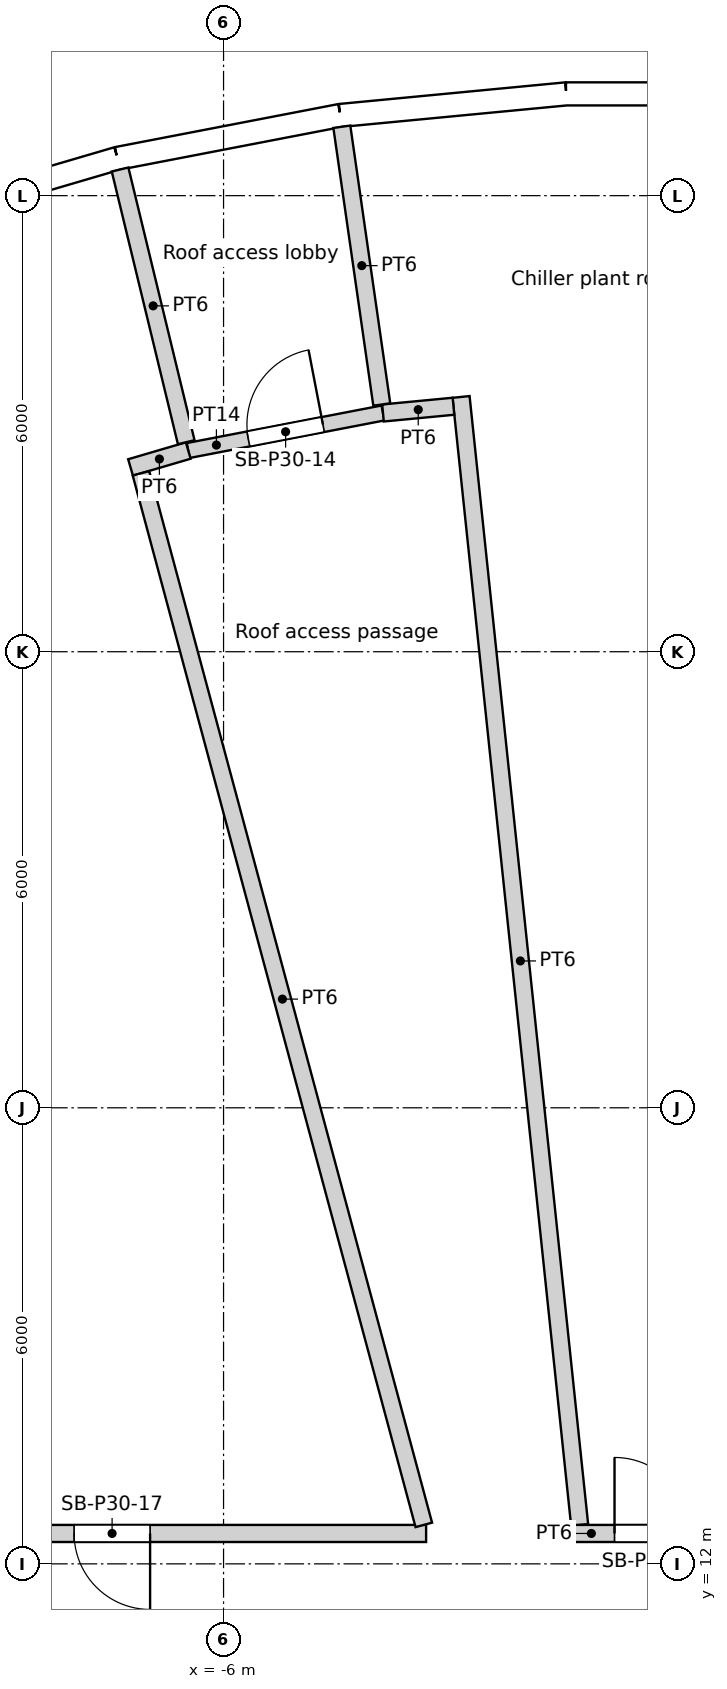
"""IFC4 building model, lengths in metres.
Left out: names, types, materials, properties, quantities, classifications, styles, units other than length and angle.
Written with IfcOpenShell. Run it as: python <this file> out.ifc"""

import sys

from ifc_helpers import new_model, si_unit, direction, frame, frame_2d, origin, origin_2d, place, context, subcontext, project, spatial, rectangle, circle, extrude, element, fill, save


model = new_model("IFC4")
c1 = context("Model", 3, precision=1e-05, world=origin(), true_north=direction((0.0, 1.0)))
c2 = subcontext(c1, "Body", "Model", "MODEL_VIEW")
j1 = project(units=[si_unit("LENGTHUNIT", "METRE"), si_unit("PLANEANGLEUNIT", "RADIAN")], contexts=[c1])
p1 = place(None, origin())
s1 = spatial("IfcSite", under=j1, at=p1, CompositionType="ELEMENT")
p2 = place(p1, origin())
s2 = spatial("IfcBuilding", under=s1, at=p2, CompositionType="ELEMENT")
p3 = place(p2, frame((0.0, 0.0, 120.0)))
s3 = spatial("IfcBuildingStorey", under=s2, at=p3, CompositionType="ELEMENT", Elevation=120.0)
p4 = place(p3, frame((-4.309, 29.966, 0.0), z_axis=(0.0, 0.0, 1.0), x_axis=(1.0, 0.0, 0.0)))
e1 = element("IfcColumn", 1, at=p4, inside=s3, PredefinedType="COLUMN", context=c2, shape_type="SweptSolid", body=[
    extrude(circle(Radius=0.6, at=origin_2d()), origin(), (0.0, 0.0, 1.0), 6.0),
])
for number, where, z_axis, x_axis in (
    (2, (-1.427, 24.506, 0.0), (0.0, 0.0, 1.0), (1.0, 0.0, 0.0)),
    (3, (-7.04, 23.516, 0.0), (0.0, 0.0, 1.0), (1.0, 0.0, 0.0)),
):
    element("IfcColumn", number, at=place(p3, frame(where, z_axis=z_axis, x_axis=x_axis)), inside=s3, PredefinedType="COLUMN", context=c2, shape_type="SweptSolid", body=[
        extrude(circle(Radius=0.65, at=origin_2d()), origin(), (0.0, 0.0, 1.0), 6.0),
    ])
p5 = place(p3, frame((-4.188, 18.35, 0.0), z_axis=(0.0, 0.0, 1.0), x_axis=(1.0, 0.0, 0.0)))
e4 = element("IfcColumn", 4, at=p5, inside=s3, PredefinedType="COLUMN", context=c2, shape_type="SweptSolid", body=[
    extrude(circle(Radius=0.7, at=origin_2d()), origin(), (0.0, 0.0, 1.0), 6.0),
])
p6 = place(p3, frame((1.493, 31.339, 0.0), z_axis=(0.0, 0.0, 1.0), x_axis=(-1.0, 0.0, 0.0)))
e5 = element("IfcWall", 5, at=p6, inside=s3, PredefinedType="SOLIDWALL", context=c2, shape_type="SweptSolid", body=[
    extrude(rectangle(XDim=2.986, YDim=0.3, at=frame_2d((1.493, 0.0))), origin(), (0.0, 0.0, 1.0), 5.7),
])
p7 = place(p6, frame((1.493, 0.0, 1.8)))
e6 = element("IfcOpeningElement", 6, at=p7, cuts=e5, PredefinedType="OPENING", context=c2, shape_type="SweptSolid", body=[
    extrude(circle(Radius=1.2, at=origin_2d()), frame((0.0, 0.16, 0.0), z_axis=(0.0, -1.0, 0.0), x_axis=(1.0, 0.0, 0.0)), (0.0, 0.0, 1.0), 0.32),
])
p8 = place(p3, frame((-1.493, 31.339, 0.0), z_axis=(0.0, 0.0, 1.0), x_axis=(-0.99547560533, -0.095017467833, 0.0)))
e7 = element("IfcWall", 7, at=p8, inside=s3, PredefinedType="SOLIDWALL", context=c2, shape_type="SweptSolid", body=[
    extrude(rectangle(XDim=2.986, YDim=0.3, at=frame_2d((1.493, 0.0))), origin(), (0.0, 0.0, 1.0), 5.7),
])
p9 = place(p8, frame((1.493, 0.0, 1.8)))
e8 = element("IfcOpeningElement", 8, at=p9, cuts=e7, PredefinedType="OPENING", context=c2, shape_type="SweptSolid", body=[
    extrude(circle(Radius=1.2, at=origin_2d()), frame((0.0, 0.16, 0.0), z_axis=(0.0, -1.0, 0.0), x_axis=(1.0, 0.0, 0.0)), (0.0, 0.0, 1.0), 0.32),
])
p10 = place(p3, frame((-4.465, 31.055, 0.0), z_axis=(0.0, 0.0, 1.0), x_axis=(-0.981918853666, -0.189302310646, 0.0)))
e9 = element("IfcWall", 9, at=p10, inside=s3, PredefinedType="SOLIDWALL", context=c2, shape_type="SweptSolid", body=[
    extrude(rectangle(XDim=2.986, YDim=0.3, at=frame_2d((1.493, 0.0))), origin(), (0.0, 0.0, 1.0), 5.7),
])
p11 = place(p10, frame((1.493, 0.0, 1.8)))
e10 = element("IfcOpeningElement", 10, at=p11, cuts=e9, PredefinedType="OPENING", context=c2, shape_type="SweptSolid", body=[
    extrude(circle(Radius=1.2, at=origin_2d()), frame((0.0, 0.16, 0.0), z_axis=(0.0, -1.0, 0.0), x_axis=(1.0, 0.0, 0.0)), (0.0, 0.0, 1.0), 0.32),
])
p12 = place(p3, frame((-7.397, 30.49, 0.0), z_axis=(0.0, 0.0, 1.0), x_axis=(-0.959502108153, -0.281701445593, 0.0)))
e11 = element("IfcWall", 11, at=p12, inside=s3, PredefinedType="SOLIDWALL", context=c2, shape_type="SweptSolid", body=[
    extrude(rectangle(XDim=2.986, YDim=0.3, at=frame_2d((1.493, 0.0))), origin(), (0.0, 0.0, 1.0), 5.7),
])
p13 = place(p12, frame((1.493, 0.0, 1.8)))
e12 = element("IfcOpeningElement", 12, at=p13, cuts=e11, PredefinedType="OPENING", context=c2, shape_type="SweptSolid", body=[
    extrude(circle(Radius=1.2, at=origin_2d()), frame((0.0, 0.16, 0.0), z_axis=(0.0, -1.0, 0.0), x_axis=(1.0, 0.0, 0.0)), (0.0, 0.0, 1.0), 0.32),
])
p14 = place(p3, frame((-7.361, 30.344, 0.0), z_axis=(0.0, 0.0, 1.0), x_axis=(0.235713599034, -0.971822565714, 0.0)))
e13 = element("IfcWall", 13, at=p14, inside=s3, PredefinedType="PARTITIONING", context=c2, shape_type="SweptSolid", body=[
    extrude(rectangle(XDim=3.691, YDim=0.225, at=frame_2d((1.846, 0.0))), origin(), (0.0, 0.0, 1.0), 5.2),
])
p15 = place(p3, frame((-7.086, 26.347, 0.0), z_axis=(0.0, 0.0, 1.0), x_axis=(0.259707010598, -0.965687459091, 0.0)))
e14 = element("IfcWall", 14, at=p15, inside=s3, PredefinedType="PARTITIONING", context=c2, shape_type="SweptSolid", body=[
    extrude(rectangle(XDim=14.327, YDim=0.225, at=frame_2d((7.163, 0.0))), origin(), (0.0, 0.0, 1.0), 5.2),
])
p16 = place(p3, frame((-6.465, 26.647, 0.0), z_axis=(0.0, 0.0, 1.0), x_axis=(-0.959542293585, -0.281564534025, 0.0)))
e15 = element("IfcWall", 15, at=p16, inside=s3, PredefinedType="PARTITIONING", context=c2, shape_type="SweptSolid", body=[
    extrude(rectangle(XDim=0.791, YDim=0.225, at=frame_2d((0.396, 0.0))), origin(), (0.0, 0.0, 1.0), 5.2),
])
p17 = place(p3, frame((-4.444, 30.906, 0.0), z_axis=(0.0, 0.0, 1.0), x_axis=(0.142319391599, -0.989820787201, 0.0)))
e16 = element("IfcWall", 16, at=p17, inside=s3, PredefinedType="PARTITIONING", context=c2, shape_type="SweptSolid", body=[
    extrude(rectangle(XDim=3.692, YDim=0.225, at=frame_2d((1.846, 0.0))), origin(), (0.0, 0.0, 1.0), 5.2),
])
p18 = place(p3, frame((-6.465, 26.647, 0.0), z_axis=(0.0, 0.0, 1.0), x_axis=(0.981924271327, 0.18927420685, 0.0)))
e17 = element("IfcWall", 17, at=p18, inside=s3, PredefinedType="PARTITIONING", context=c2, shape_type="SweptSolid", body=[
    extrude(rectangle(XDim=2.609, YDim=0.2, at=frame_2d((1.305, 0.0))), origin(), (0.0, 0.0, 1.0), 5.2),
])
p19 = place(p18, frame((0.805, 0.0, 0.0)))
e18 = element("IfcOpeningElement", 18, at=p19, cuts=e17, PredefinedType="OPENING", context=c2, shape_type="SweptSolid", body=[
    extrude(rectangle(XDim=1.0, YDim=2.1, at=frame_2d((0.5, 1.05))), frame((0.0, 0.1, 0.0), z_axis=(0.0, -1.0, 0.0), x_axis=(1.0, 0.0, 0.0)), (0.0, 0.0, 1.0), 0.2),
])
p20 = place(p3, frame((-3.335, 12.4, 0.0), z_axis=(0.0, 0.0, 1.0), x_axis=(-1.0, 0.0, 0.0)))
e19 = element("IfcWall", 19, at=p20, inside=s3, PredefinedType="PARTITIONING", context=c2, shape_type="SweptSolid", body=[
    extrude(rectangle(XDim=8.375, YDim=0.225, at=frame_2d((4.188, 0.0))), origin(), (0.0, 0.0, 1.0), 5.2),
])
p21 = place(p20, frame((3.631, 0.0, 0.0)))
e20 = element("IfcOpeningElement", 20, at=p21, cuts=e19, PredefinedType="OPENING", context=c2, shape_type="SweptSolid", body=[
    extrude(rectangle(XDim=1.0, YDim=2.1, at=frame_2d((0.5, 1.05))), frame((0.0, 0.113, 0.0), z_axis=(0.0, -1.0, 0.0), x_axis=(1.0, 0.0, 0.0)), (0.0, 0.0, 1.0), 0.225),
])
p22 = place(p3, frame((-2.975, 27.229, 0.0), z_axis=(0.0, 0.0, 1.0), x_axis=(-0.995461237405, -0.095167877055, 0.0)))
e21 = element("IfcWall", 21, at=p22, inside=s3, PredefinedType="PARTITIONING", context=c2, shape_type="SweptSolid", body=[
    extrude(rectangle(XDim=0.931, YDim=0.225, at=frame_2d((0.466, 0.0))), origin(), (0.0, 0.0, 1.0), 5.2),
])
p23 = place(p3, frame((-2.875, 27.352, 0.0), z_axis=(0.0, 0.0, 1.0), x_axis=(0.104532331853, -0.994521488756, 0.0)))
e22 = element("IfcWall", 22, at=p23, inside=s3, PredefinedType="PARTITIONING", context=c2, shape_type="SweptSolid", body=[
    extrude(rectangle(XDim=14.922, YDim=0.225, at=frame_2d((7.461, 0.0))), origin(), (0.0, 0.0, 1.0), 5.2),
])
p24 = place(p3, frame((0.591, 12.4, 0.0), z_axis=(0.0, 0.0, 1.0), x_axis=(-1.0, 0.0, 0.0)))
e23 = element("IfcWall", 23, at=p24, inside=s3, PredefinedType="PARTITIONING", context=c2, shape_type="SweptSolid", body=[
    extrude(rectangle(XDim=2.007, YDim=0.225, at=frame_2d((1.003, 0.0))), origin(), (0.0, 0.0, 1.0), 5.2),
])
p25 = place(p24, frame((0.447, 0.0, 0.0)))
e24 = element("IfcOpeningElement", 24, at=p25, cuts=e23, PredefinedType="OPENING", context=c2, shape_type="SweptSolid", body=[
    extrude(rectangle(XDim=1.0, YDim=2.1, at=frame_2d((0.5, 1.05))), frame((0.0, 0.113, 0.0), z_axis=(0.0, -1.0, 0.0), x_axis=(1.0, 0.0, 0.0)), (0.0, 0.0, 1.0), 0.225),
])
p26 = place(p7, origin())
e25 = element("IfcWindow", 25, at=p26, inside=s3, PartitioningType="SINGLE_PANEL", PredefinedType="WINDOW", context=c2, shape_type="SweptSolid", body=[
    extrude(circle(Radius=1.2, at=origin_2d()), frame((0.0, 0.12, 0.0), z_axis=(0.0, -1.0, 0.0), x_axis=(1.0, 0.0, 0.0)), (0.0, 0.0, 1.0), 0.1),
])
fill(e6, e25)
p27 = place(p9, origin())
e26 = element("IfcWindow", 26, at=p27, inside=s3, PartitioningType="SINGLE_PANEL", PredefinedType="WINDOW", context=c2, shape_type="SweptSolid", body=[
    extrude(circle(Radius=1.2, at=origin_2d()), frame((0.0, 0.12, 0.0), z_axis=(0.0, -1.0, 0.0), x_axis=(1.0, 0.0, 0.0)), (0.0, 0.0, 1.0), 0.1),
])
fill(e8, e26)
p28 = place(p11, origin())
e27 = element("IfcWindow", 27, at=p28, inside=s3, PartitioningType="SINGLE_PANEL", PredefinedType="WINDOW", context=c2, shape_type="SweptSolid", body=[
    extrude(circle(Radius=1.2, at=origin_2d()), frame((0.0, 0.12, 0.0), z_axis=(0.0, -1.0, 0.0), x_axis=(1.0, 0.0, 0.0)), (0.0, 0.0, 1.0), 0.1),
])
fill(e10, e27)
p29 = place(p13, origin())
e28 = element("IfcWindow", 28, at=p29, inside=s3, PartitioningType="SINGLE_PANEL", PredefinedType="WINDOW", context=c2, shape_type="SweptSolid", body=[
    extrude(circle(Radius=1.2, at=origin_2d()), frame((0.0, 0.12, 0.0), z_axis=(0.0, -1.0, 0.0), x_axis=(1.0, 0.0, 0.0)), (0.0, 0.0, 1.0), 0.1),
])
fill(e12, e28)
p30 = place(p19, origin())
e29 = element("IfcDoor", 29, at=p30, inside=s3, OperationType="SINGLE_SWING_RIGHT", PredefinedType="DOOR", context=c2, shape_type="SweptSolid", body=[
    extrude(rectangle(XDim=1.0, YDim=2.1, at=frame_2d((0.5, 1.05))), frame((0.0, 0.025, 0.0), z_axis=(0.0, -1.0, 0.0), x_axis=(1.0, 0.0, 0.0)), (0.0, 0.0, 1.0), 0.05),
])
fill(e18, e29)
p31 = place(p25, origin())
e30 = element("IfcDoor", 30, at=p31, inside=s3, OperationType="SINGLE_SWING_LEFT", PredefinedType="DOOR", context=c2, shape_type="SweptSolid", body=[
    extrude(rectangle(XDim=1.0, YDim=2.1, at=frame_2d((0.5, 1.05))), frame((0.0, 0.025, 0.0), z_axis=(0.0, -1.0, 0.0), x_axis=(1.0, 0.0, 0.0)), (0.0, 0.0, 1.0), 0.05),
])
fill(e24, e30)
p32 = place(p21, origin())
e31 = element("IfcDoor", 31, at=p32, inside=s3, OperationType="SINGLE_SWING_LEFT", PredefinedType="DOOR", context=c2, shape_type="SweptSolid", body=[
    extrude(rectangle(XDim=1.0, YDim=2.1, at=frame_2d((0.5, 1.05))), frame((0.0, 0.025, 0.0), z_axis=(0.0, -1.0, 0.0), x_axis=(1.0, 0.0, 0.0)), (0.0, 0.0, 1.0), 0.05),
])
fill(e20, e31)
save(model, sys.argv[1])
